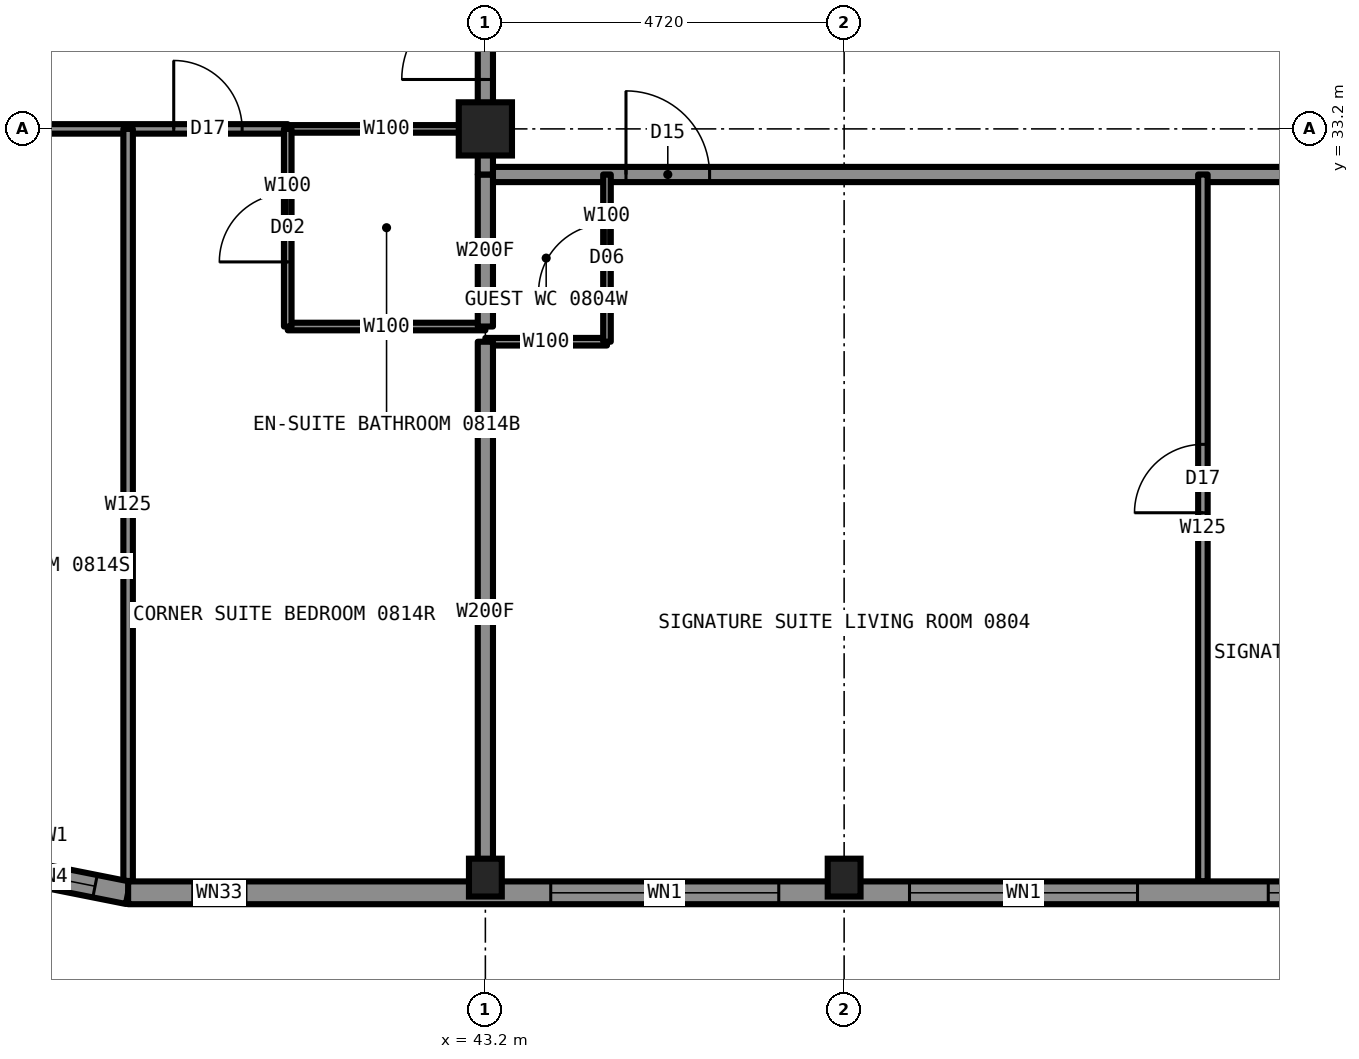
"""IFC4 building model, lengths in metres.
Left out: names, types, materials, properties, quantities, classifications, styles, units other than length and angle.
Written with IfcOpenShell. Run it as: python <this file> out.ifc"""

import sys

from ifc_helpers import new_model, si_unit, direction, frame, frame_2d, origin, origin_2d, place, context, subcontext, project, spatial, rectangle, hollow_rectangle, i_section, extrude, element, fill, save


model = new_model("IFC4")
c1 = context("Model", 3, precision=1e-05, world=origin(), true_north=direction((0.0, 1.0)))
c2 = subcontext(c1, "Body", "Model", "MODEL_VIEW")
j1 = project(units=[si_unit("LENGTHUNIT", "METRE"), si_unit("PLANEANGLEUNIT", "RADIAN")], contexts=[c1])
p1 = place(None, origin())
s1 = spatial("IfcSite", under=j1, at=p1, CompositionType="ELEMENT")
p2 = place(p1, origin())
s2 = spatial("IfcBuilding", under=s1, at=p2, CompositionType="ELEMENT")
p3 = place(p2, frame((0.0, 0.0, 28.5)))
s3 = spatial("IfcBuildingStorey", under=s2, at=p3, CompositionType="ELEMENT", Elevation=28.5)
for number, where, z_axis, x_axis in (
    (1, (43.2, 23.35, 0.0), (0.0, 0.0, 1.0), (1.0, 0.0, 0.0)),
    (2, (47.92, 23.35, 0.0), (0.0, 0.0, 1.0), (1.0, 0.0, 0.0)),
):
    element("IfcColumn", number, at=place(p3, frame(where, z_axis=z_axis, x_axis=x_axis)), inside=s3, PredefinedType="COLUMN", context=c2, shape_type="SweptSolid", body=[
        extrude(i_section(OverallWidth=0.432, OverallDepth=0.498, WebThickness=0.056, FlangeThickness=0.089, at=origin_2d()), origin(), (0.0, 0.0, 1.0), 3.5),
    ])
p4 = place(p3, frame((43.2, 33.2, 0.0), z_axis=(0.0, 0.0, 1.0), x_axis=(1.0, 0.0, 0.0)))
e3 = element("IfcColumn", 3, at=p4, inside=s3, PredefinedType="COLUMN", context=c2, shape_type="SweptSolid", body=[
    extrude(hollow_rectangle(XDim=0.7, YDim=0.7, WallThickness=0.06, at=origin_2d()), origin(), (0.0, 0.0, 1.0), 3.5),
])
p5 = place(p3, frame((40.6, 33.2, 0.0), z_axis=(0.0, 0.0, 1.0), x_axis=(1.0, 0.0, 0.0)))
e4 = element("IfcWall", 4, at=p5, inside=s3, PredefinedType="PARTITIONING", context=c2, shape_type="SweptSolid", body=[
    extrude(rectangle(XDim=2.6, YDim=0.1, at=frame_2d((1.3, 0.0))), origin(), (0.0, 0.0, 1.0), 2.573),
])
p6 = place(p3, frame((33.3, 33.2, 0.0), z_axis=(0.0, 0.0, 1.0), x_axis=(1.0, 0.0, 0.0)))
e5 = element("IfcWall", 5, at=p6, inside=s3, PredefinedType="PARTITIONING", context=c2, shape_type="SweptSolid", body=[
    extrude(rectangle(XDim=7.3, YDim=0.125, at=frame_2d((3.65, 0.0))), origin(), (0.0, 0.0, 1.0), 2.573),
])
p7 = place(p6, frame((5.8, 0.0, 0.0)))
e6 = element("IfcOpeningElement", 6, at=p7, cuts=e5, PredefinedType="OPENING", context=c2, shape_type="SweptSolid", body=[
    extrude(rectangle(XDim=0.9, YDim=2.2, at=frame_2d((0.45, 1.1))), frame((0.0, 0.073, 0.0), z_axis=(0.0, -1.0, 0.0), x_axis=(1.0, 0.0, 0.0)), (0.0, 0.0, 1.0), 0.145),
])
p8 = place(p6, frame((2.0, 0.0, 0.0)))
e7 = element("IfcOpeningElement", 7, at=p8, cuts=e5, PredefinedType="OPENING", context=c2, shape_type="SweptSolid", body=[
    extrude(rectangle(XDim=0.9, YDim=2.2, at=frame_2d((0.45, 1.1))), frame((0.0, 0.073, 0.0), z_axis=(0.0, -1.0, 0.0), x_axis=(1.0, 0.0, 0.0)), (0.0, 0.0, 1.0), 0.145),
])
p9 = place(p3, frame((43.2, 32.6, 0.0), z_axis=(0.0, 0.0, 1.0), x_axis=(1.0, 0.0, 0.0)))
e8 = element("IfcWall", 8, at=p9, inside=s3, PredefinedType="PARTITIONING", context=c2, shape_type="SweptSolid", body=[
    extrude(rectangle(XDim=23.6, YDim=0.2, at=frame_2d((11.8, 0.0))), origin(), (0.0, 0.0, 1.0), 3.33),
])
p10 = place(p9, frame((1.85, 0.0, 0.0)))
e9 = element("IfcOpeningElement", 9, at=p10, cuts=e8, PredefinedType="OPENING", context=c2, shape_type="SweptSolid", body=[
    extrude(rectangle(XDim=1.1, YDim=2.2, at=frame_2d((0.55, 1.1))), frame((0.0, 0.11, 0.0), z_axis=(0.0, -1.0, 0.0), x_axis=(1.0, 0.0, 0.0)), (0.0, 0.0, 1.0), 0.22),
])
p11 = place(p9, frame((14.56, 0.0, 0.0)))
e10 = element("IfcOpeningElement", 10, at=p11, cuts=e8, PredefinedType="OPENING", context=c2, shape_type="SweptSolid", body=[
    extrude(rectangle(XDim=1.0, YDim=2.2, at=frame_2d((0.5, 1.1))), frame((0.0, 0.11, 0.0), z_axis=(0.0, -1.0, 0.0), x_axis=(1.0, 0.0, 0.0)), (0.0, 0.0, 1.0), 0.22),
])
p12 = place(p9, frame((19.28, 0.0, 0.0)))
e11 = element("IfcOpeningElement", 11, at=p12, cuts=e8, PredefinedType="OPENING", context=c2, shape_type="SweptSolid", body=[
    extrude(rectangle(XDim=1.0, YDim=2.2, at=frame_2d((0.5, 1.1))), frame((0.0, 0.11, 0.0), z_axis=(0.0, -1.0, 0.0), x_axis=(1.0, 0.0, 0.0)), (0.0, 0.0, 1.0), 0.22),
])
p13 = place(p3, frame((40.6, 30.6, 0.0), z_axis=(0.0, 0.0, 1.0), x_axis=(1.0, 0.0, 0.0)))
e12 = element("IfcWall", 12, at=p13, inside=s3, PredefinedType="PARTITIONING", context=c2, shape_type="SweptSolid", body=[
    extrude(rectangle(XDim=2.6, YDim=0.1, at=frame_2d((1.3, 0.0))), origin(), (0.0, 0.0, 1.0), 3.33),
])
p14 = place(p3, frame((43.2, 30.4, 0.0), z_axis=(0.0, 0.0, 1.0), x_axis=(1.0, 0.0, 0.0)))
e13 = element("IfcWall", 13, at=p14, inside=s3, PredefinedType="PARTITIONING", context=c2, shape_type="SweptSolid", body=[
    extrude(rectangle(XDim=1.6, YDim=0.1, at=frame_2d((0.8, 0.0))), origin(), (0.0, 0.0, 1.0), 3.33),
])
p15 = place(p3, frame((44.8, 30.4, 0.0), z_axis=(0.0, 0.0, 1.0), x_axis=(0.0, 1.0, 0.0)))
e14 = element("IfcWall", 14, at=p15, inside=s3, PredefinedType="PARTITIONING", context=c2, shape_type="SweptSolid", body=[
    extrude(rectangle(XDim=2.2, YDim=0.1, at=frame_2d((1.1, 0.0))), origin(), (0.0, 0.0, 1.0), 3.33),
])
p16 = place(p15, frame((0.65, 0.0, 0.0)))
e15 = element("IfcOpeningElement", 15, at=p16, cuts=e14, PredefinedType="OPENING", context=c2, shape_type="SweptSolid", body=[
    extrude(rectangle(XDim=0.9, YDim=2.1, at=frame_2d((0.45, 1.05))), frame((0.0, 0.06, 0.0), z_axis=(0.0, -1.0, 0.0), x_axis=(1.0, 0.0, 0.0)), (0.0, 0.0, 1.0), 0.12),
])
p17 = place(p3, frame((43.2, 33.22, 0.0), z_axis=(0.0, 0.0, 1.0), x_axis=(0.0, 1.0, 0.0)))
e16 = element("IfcWall", 16, at=p17, inside=s3, PredefinedType="PARTITIONING", context=c2, shape_type="SweptSolid", body=[
    extrude(rectangle(XDim=23.56, YDim=0.2, at=frame_2d((11.78, 0.0))), origin(), (0.0, 0.0, 1.0), 3.33),
])
p18 = place(p17, frame((6.16, 0.0, 0.0)))
e17 = element("IfcOpeningElement", 17, at=p18, cuts=e16, PredefinedType="OPENING", context=c2, shape_type="SweptSolid", body=[
    extrude(rectangle(XDim=1.0, YDim=2.2, at=frame_2d((0.5, 1.1))), frame((0.0, 0.11, 0.0), z_axis=(0.0, -1.0, 0.0), x_axis=(1.0, 0.0, 0.0)), (0.0, 0.0, 1.0), 0.22),
])
p19 = place(p17, frame((11.68, 0.0, 0.0)))
e18 = element("IfcOpeningElement", 18, at=p19, cuts=e16, PredefinedType="OPENING", context=c2, shape_type="SweptSolid", body=[
    extrude(rectangle(XDim=1.0, YDim=2.2, at=frame_2d((0.5, 1.1))), frame((0.0, 0.11, 0.0), z_axis=(0.0, -1.0, 0.0), x_axis=(1.0, 0.0, 0.0)), (0.0, 0.0, 1.0), 0.22),
])
p20 = place(p17, frame((14.54, 0.0, 0.0)))
e19 = element("IfcOpeningElement", 19, at=p20, cuts=e16, PredefinedType="OPENING", context=c2, shape_type="SweptSolid", body=[
    extrude(rectangle(XDim=1.0, YDim=2.2, at=frame_2d((0.5, 1.1))), frame((0.0, 0.11, 0.0), z_axis=(0.0, -1.0, 0.0), x_axis=(1.0, 0.0, 0.0)), (0.0, 0.0, 1.0), 0.22),
])
p21 = place(p17, frame((21.83, 0.0, 0.0)))
e20 = element("IfcOpeningElement", 20, at=p21, cuts=e16, PredefinedType="OPENING", context=c2, shape_type="SweptSolid", body=[
    extrude(rectangle(XDim=1.1, YDim=2.2, at=frame_2d((0.55, 1.1))), frame((0.0, 0.11, 0.0), z_axis=(0.0, -1.0, 0.0), x_axis=(1.0, 0.0, 0.0)), (0.0, 0.0, 1.0), 0.22),
])
p22 = place(p17, frame((0.63, 0.0, 0.0)))
e21 = element("IfcOpeningElement", 21, at=p22, cuts=e16, PredefinedType="OPENING", context=c2, shape_type="SweptSolid", body=[
    extrude(rectangle(XDim=1.1, YDim=2.2, at=frame_2d((0.55, 1.1))), frame((0.0, 0.11, 0.0), z_axis=(0.0, -1.0, 0.0), x_axis=(1.0, 0.0, 0.0)), (0.0, 0.0, 1.0), 0.22),
])
p23 = place(p3, frame((43.2, 23.3, 0.0), z_axis=(0.0, 0.0, 1.0), x_axis=(0.0, 1.0, 0.0)))
e22 = element("IfcWall", 22, at=p23, inside=s3, PredefinedType="PARTITIONING", context=c2, shape_type="SweptSolid", body=[
    extrude(rectangle(XDim=7.1, YDim=0.2, at=frame_2d((3.55, 0.0))), origin(), (0.0, 0.0, 1.0), 2.573),
])
p24 = place(p3, frame((43.2, 30.6, 0.0), z_axis=(0.0, 0.0, 1.0), x_axis=(0.0, 1.0, 0.0)))
e23 = element("IfcWall", 23, at=p24, inside=s3, PredefinedType="PARTITIONING", context=c2, shape_type="SweptSolid", body=[
    extrude(rectangle(XDim=2.0, YDim=0.2, at=frame_2d((1.0, 0.0))), origin(), (0.0, 0.0, 1.0), 2.573),
])
p25 = place(p3, frame((40.6, 30.6, 0.0), z_axis=(0.0, 0.0, 1.0), x_axis=(0.0, 1.0, 0.0)))
e24 = element("IfcWall", 24, at=p25, inside=s3, PredefinedType="PARTITIONING", context=c2, shape_type="SweptSolid", body=[
    extrude(rectangle(XDim=2.6, YDim=0.1, at=frame_2d((1.3, 0.0))), origin(), (0.0, 0.0, 1.0), 3.33),
])
p26 = place(p25, frame((0.85, 0.0, 0.0)))
e25 = element("IfcOpeningElement", 25, at=p26, cuts=e24, PredefinedType="OPENING", context=c2, shape_type="SweptSolid", body=[
    extrude(rectangle(XDim=0.9, YDim=2.1, at=frame_2d((0.45, 1.05))), frame((0.0, 0.06, 0.0), z_axis=(0.0, -1.0, 0.0), x_axis=(1.0, 0.0, 0.0)), (0.0, 0.0, 1.0), 0.12),
])
p27 = place(p3, frame((38.5, 23.306, 0.0), z_axis=(0.0, 0.0, 1.0), x_axis=(0.0, 1.0, 0.0)))
e26 = element("IfcWall", 26, at=p27, inside=s3, PredefinedType="PARTITIONING", context=c2, shape_type="SweptSolid", body=[
    extrude(rectangle(XDim=9.894, YDim=0.125, at=frame_2d((4.947, 0.0))), origin(), (0.0, 0.0, 1.0), 3.33),
])
p28 = place(p3, frame((52.64, 23.3, 0.0), z_axis=(0.0, 0.0, 1.0), x_axis=(0.0, 1.0, 0.0)))
e27 = element("IfcWall", 27, at=p28, inside=s3, PredefinedType="PARTITIONING", context=c2, shape_type="SweptSolid", body=[
    extrude(rectangle(XDim=9.3, YDim=0.125, at=frame_2d((4.65, 0.0))), origin(), (0.0, 0.0, 1.0), 3.33),
])
p29 = place(p28, frame((4.85, 0.0, 0.0)))
e28 = element("IfcOpeningElement", 28, at=p29, cuts=e27, PredefinedType="OPENING", context=c2, shape_type="SweptSolid", body=[
    extrude(rectangle(XDim=0.9, YDim=2.2, at=frame_2d((0.45, 1.1))), frame((0.0, 0.073, 0.0), z_axis=(0.0, -1.0, 0.0), x_axis=(1.0, 0.0, 0.0)), (0.0, 0.0, 1.0), 0.145),
])
p30 = place(p3, frame((36.453, 23.557, 0.0), z_axis=(0.0, 0.0, 1.0), x_axis=(0.980787050784, -0.195081421501, 0.0)))
e29 = element("IfcWall", 29, at=p30, inside=s3, PredefinedType="SOLIDWALL", context=c2, shape_type="SweptSolid", body=[
    extrude(rectangle(XDim=2.087, YDim=0.3, at=frame_2d((1.044, 0.0))), origin(), (0.0, 0.0, 1.0), 3.33),
])
p31 = place(p30, frame((0.844, 0.0, 0.5)))
e30 = element("IfcOpeningElement", 30, at=p31, cuts=e29, PredefinedType="OPENING", context=c2, shape_type="SweptSolid", body=[
    extrude(rectangle(XDim=0.8, YDim=1.1, at=frame_2d((0.4, 0.55))), frame((0.0, 0.16, 0.0), z_axis=(0.0, -1.0, 0.0), x_axis=(1.0, 0.0, 0.0)), (0.0, 0.0, 1.0), 0.32),
])
p32 = place(p3, frame((38.5, 23.15, 0.0), z_axis=(0.0, 0.0, 1.0), x_axis=(1.0, 0.0, 0.0)))
e31 = element("IfcWall", 31, at=p32, inside=s3, PredefinedType="SOLIDWALL", context=c2, shape_type="SweptSolid", body=[
    extrude(rectangle(XDim=33.0, YDim=0.3, at=frame_2d((16.5, 0.0))), origin(), (0.0, 0.0, 1.0), 2.83),
])
p33 = place(p32, frame((0.85, 0.0, 0.5)))
e32 = element("IfcOpeningElement", 32, at=p33, cuts=e31, PredefinedType="OPENING", context=c2, shape_type="SweptSolid", body=[
    extrude(rectangle(XDim=3.0, YDim=2.0, at=frame_2d((1.5, 1.0))), frame((0.0, 0.16, 0.0), z_axis=(0.0, -1.0, 0.0), x_axis=(1.0, 0.0, 0.0)), (0.0, 0.0, 1.0), 0.32),
])
p34 = place(p32, frame((5.56, 0.0, 0.5)))
e33 = element("IfcOpeningElement", 33, at=p34, cuts=e31, PredefinedType="OPENING", context=c2, shape_type="SweptSolid", body=[
    extrude(rectangle(XDim=3.0, YDim=2.0, at=frame_2d((1.5, 1.0))), frame((0.0, 0.16, 0.0), z_axis=(0.0, -1.0, 0.0), x_axis=(1.0, 0.0, 0.0)), (0.0, 0.0, 1.0), 0.32),
])
p35 = place(p32, frame((10.28, 0.0, 0.5)))
e34 = element("IfcOpeningElement", 34, at=p35, cuts=e31, PredefinedType="OPENING", context=c2, shape_type="SweptSolid", body=[
    extrude(rectangle(XDim=3.0, YDim=2.0, at=frame_2d((1.5, 1.0))), frame((0.0, 0.16, 0.0), z_axis=(0.0, -1.0, 0.0), x_axis=(1.0, 0.0, 0.0)), (0.0, 0.0, 1.0), 0.32),
])
p36 = place(p32, frame((15.0, 0.0, 0.5)))
e35 = element("IfcOpeningElement", 35, at=p36, cuts=e31, PredefinedType="OPENING", context=c2, shape_type="SweptSolid", body=[
    extrude(rectangle(XDim=3.0, YDim=2.0, at=frame_2d((1.5, 1.0))), frame((0.0, 0.16, 0.0), z_axis=(0.0, -1.0, 0.0), x_axis=(1.0, 0.0, 0.0)), (0.0, 0.0, 1.0), 0.32),
])
p37 = place(p32, frame((19.72, 0.0, 0.5)))
e36 = element("IfcOpeningElement", 36, at=p37, cuts=e31, PredefinedType="OPENING", context=c2, shape_type="SweptSolid", body=[
    extrude(rectangle(XDim=3.0, YDim=2.0, at=frame_2d((1.5, 1.0))), frame((0.0, 0.16, 0.0), z_axis=(0.0, -1.0, 0.0), x_axis=(1.0, 0.0, 0.0)), (0.0, 0.0, 1.0), 0.32),
])
p38 = place(p32, frame((24.44, 0.0, 0.5)))
e37 = element("IfcOpeningElement", 37, at=p38, cuts=e31, PredefinedType="OPENING", context=c2, shape_type="SweptSolid", body=[
    extrude(rectangle(XDim=3.0, YDim=2.0, at=frame_2d((1.5, 1.0))), frame((0.0, 0.16, 0.0), z_axis=(0.0, -1.0, 0.0), x_axis=(1.0, 0.0, 0.0)), (0.0, 0.0, 1.0), 0.32),
])
p39 = place(p32, frame((29.15, 0.0, 0.5)))
e38 = element("IfcOpeningElement", 38, at=p39, cuts=e31, PredefinedType="OPENING", context=c2, shape_type="SweptSolid", body=[
    extrude(rectangle(XDim=3.0, YDim=2.0, at=frame_2d((1.5, 1.0))), frame((0.0, 0.16, 0.0), z_axis=(0.0, -1.0, 0.0), x_axis=(1.0, 0.0, 0.0)), (0.0, 0.0, 1.0), 0.32),
])
p40 = place(p3, frame((43.2, 32.6, 0.0), z_axis=(0.0, 0.0, 1.0), x_axis=(0.0, 1.0, 0.0)))
e39 = element("IfcWall", 39, at=p40, inside=s3, PredefinedType="PARTITIONING", context=c2, shape_type="SweptSolid", body=[
    extrude(rectangle(XDim=0.62, YDim=0.2, at=frame_2d((0.31, 0.0))), origin(), (0.0, 0.0, 1.0), 2.573),
])
p41 = place(p10, origin())
e40 = element("IfcDoor", 40, at=p41, inside=s3, OperationType="SINGLE_SWING_LEFT", PredefinedType="DOOR", context=c2, shape_type="SweptSolid", body=[
    extrude(rectangle(XDim=1.1, YDim=2.2, at=frame_2d((0.55, 1.1))), frame((0.0, 0.025, 0.0), z_axis=(0.0, -1.0, 0.0), x_axis=(1.0, 0.0, 0.0)), (0.0, 0.0, 1.0), 0.05),
])
fill(e9, e40)
p42 = place(p29, origin())
e41 = element("IfcDoor", 41, at=p42, inside=s3, OperationType="SINGLE_SWING_LEFT", PredefinedType="DOOR", context=c2, shape_type="SweptSolid", body=[
    extrude(rectangle(XDim=0.9, YDim=2.2, at=frame_2d((0.45, 1.1))), frame((0.0, 0.025, 0.0), z_axis=(0.0, -1.0, 0.0), x_axis=(1.0, 0.0, 0.0)), (0.0, 0.0, 1.0), 0.05),
])
fill(e28, e41)
p43 = place(p16, origin())
e42 = element("IfcDoor", 42, at=p43, inside=s3, OperationType="SINGLE_SWING_LEFT", PredefinedType="DOOR", context=c2, shape_type="SweptSolid", body=[
    extrude(rectangle(XDim=0.9, YDim=2.1, at=frame_2d((0.45, 1.05))), frame((0.0, 0.025, 0.0), z_axis=(0.0, -1.0, 0.0), x_axis=(1.0, 0.0, 0.0)), (0.0, 0.0, 1.0), 0.05),
])
fill(e15, e42)
p44 = place(p22, origin())
e43 = element("IfcDoor", 43, at=p44, inside=s3, OperationType="SINGLE_SWING_LEFT", PredefinedType="DOOR", context=c2, shape_type="SweptSolid", body=[
    extrude(rectangle(XDim=1.1, YDim=2.2, at=frame_2d((0.55, 1.1))), frame((0.0, 0.025, 0.0), z_axis=(0.0, -1.0, 0.0), x_axis=(1.0, 0.0, 0.0)), (0.0, 0.0, 1.0), 0.05),
])
fill(e21, e43)
p45 = place(p26, origin())
e44 = element("IfcDoor", 44, at=p45, inside=s3, OperationType="SINGLE_SWING_RIGHT", PredefinedType="DOOR", context=c2, shape_type="SweptSolid", body=[
    extrude(rectangle(XDim=0.9, YDim=2.1, at=frame_2d((0.45, 1.05))), frame((0.0, 0.025, 0.0), z_axis=(0.0, -1.0, 0.0), x_axis=(1.0, 0.0, 0.0)), (0.0, 0.0, 1.0), 0.05),
])
fill(e25, e44)
p46 = place(p7, origin())
e45 = element("IfcDoor", 45, at=p46, inside=s3, OperationType="SINGLE_SWING_LEFT", PredefinedType="DOOR", context=c2, shape_type="SweptSolid", body=[
    extrude(rectangle(XDim=0.9, YDim=2.2, at=frame_2d((0.45, 1.1))), frame((0.0, 0.025, 0.0), z_axis=(0.0, -1.0, 0.0), x_axis=(1.0, 0.0, 0.0)), (0.0, 0.0, 1.0), 0.05),
])
fill(e6, e45)
p47 = place(p31, origin())
e46 = element("IfcWindow", 46, at=p47, inside=s3, PartitioningType="SINGLE_PANEL", PredefinedType="WINDOW", context=c2, shape_type="SweptSolid", body=[
    extrude(rectangle(XDim=0.8, YDim=1.1, at=frame_2d((0.4, 0.55))), frame((0.0, 0.03, 0.0), z_axis=(0.0, -1.0, 0.0), x_axis=(1.0, 0.0, 0.0)), (0.0, 0.0, 1.0), 0.06),
])
fill(e30, e46)
p48 = place(p33, origin())
e47 = element("IfcWindow", 47, at=p48, inside=s3, PartitioningType="SINGLE_PANEL", PredefinedType="WINDOW", context=c2, shape_type="SweptSolid", body=[
    extrude(rectangle(XDim=3.0, YDim=2.0, at=frame_2d((1.5, 1.0))), frame((0.0, 0.03, 0.0), z_axis=(0.0, -1.0, 0.0), x_axis=(1.0, 0.0, 0.0)), (0.0, 0.0, 1.0), 0.06),
])
fill(e32, e47)
p49 = place(p34, origin())
e48 = element("IfcWindow", 48, at=p49, inside=s3, PartitioningType="SINGLE_PANEL", PredefinedType="WINDOW", context=c2, shape_type="SweptSolid", body=[
    extrude(rectangle(XDim=3.0, YDim=2.0, at=frame_2d((1.5, 1.0))), frame((0.0, 0.03, 0.0), z_axis=(0.0, -1.0, 0.0), x_axis=(1.0, 0.0, 0.0)), (0.0, 0.0, 1.0), 0.06),
])
fill(e33, e48)
p50 = place(p35, origin())
e49 = element("IfcWindow", 49, at=p50, inside=s3, PartitioningType="SINGLE_PANEL", PredefinedType="WINDOW", context=c2, shape_type="SweptSolid", body=[
    extrude(rectangle(XDim=3.0, YDim=2.0, at=frame_2d((1.5, 1.0))), frame((0.0, 0.03, 0.0), z_axis=(0.0, -1.0, 0.0), x_axis=(1.0, 0.0, 0.0)), (0.0, 0.0, 1.0), 0.06),
])
fill(e34, e49)
p51 = place(p36, origin())
e50 = element("IfcWindow", 50, at=p51, inside=s3, PartitioningType="SINGLE_PANEL", PredefinedType="WINDOW", context=c2, shape_type="SweptSolid", body=[
    extrude(rectangle(XDim=3.0, YDim=2.0, at=frame_2d((1.5, 1.0))), frame((0.0, 0.03, 0.0), z_axis=(0.0, -1.0, 0.0), x_axis=(1.0, 0.0, 0.0)), (0.0, 0.0, 1.0), 0.06),
])
fill(e35, e50)
save(model, sys.argv[1])
